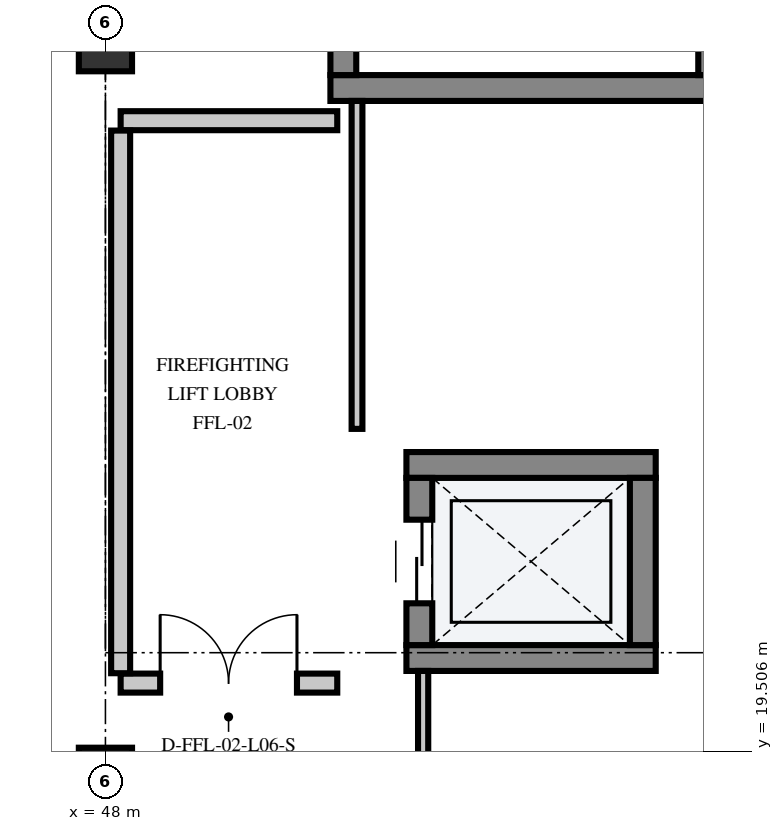
"""IFC4 building model, lengths in metres.
Left out: names, types, materials, properties, quantities, classifications, styles, units other than length and angle.
Written with IfcOpenShell. Run it as: python <this file> out.ifc"""

import sys

from ifc_helpers import new_model, si_unit, direction, frame, frame_2d, origin, origin_2d, place, context, subcontext, project, spatial, rectangle, extrude, element, fill, save


model = new_model("IFC4")
c1 = context("Model", 3, precision=1e-05, world=origin(), true_north=direction((0.0, 1.0)))
c2 = subcontext(c1, "Body", "Model", "MODEL_VIEW")
j1 = project(units=[si_unit("LENGTHUNIT", "METRE"), si_unit("PLANEANGLEUNIT", "RADIAN")], contexts=[c1])
p1 = place(None, origin())
s1 = spatial("IfcSite", under=j1, at=p1, CompositionType="ELEMENT")
p2 = place(p1, origin())
s2 = spatial("IfcBuilding", under=s1, at=p2, CompositionType="ELEMENT")
p3 = place(p2, frame((0.0, 0.0, 29.4)))
s3 = spatial("IfcBuildingStorey", under=s2, at=p3, CompositionType="ELEMENT", Elevation=29.4)
for number, where, z_axis, x_axis in (
    (1, (48.0, 19.2, 0.0), (0.0, 0.0, 1.0), (1.0, 0.0, 0.0)),
    (2, (48.0, 28.8, 0.0), (0.0, 0.0, 1.0), (1.0, 0.0, 0.0)),
):
    element("IfcColumn", number, at=place(p3, frame(where, z_axis=z_axis, x_axis=x_axis)), inside=s3, PredefinedType="COLUMN", context=c2, shape_type="SweptSolid", body=[
        extrude(rectangle(XDim=0.7, YDim=0.7, at=origin_2d()), origin(), (0.0, 0.0, 1.0), 4.8),
    ])
p4 = place(p3, frame((50.96, 28.23, 0.0), z_axis=(0.0, 0.0, 1.0), x_axis=(1.0, 0.0, 0.0)))
e3 = element("IfcWall", 3, at=p4, inside=s3, PredefinedType="SHEAR", context=c2, shape_type="SweptSolid", body=[
    extrude(rectangle(XDim=5.18, YDim=0.34, at=frame_2d((2.59, 0.0))), origin(), (0.0, 0.0, 1.0), 4.525),
])
p5 = place(p3, frame((55.97, 28.4, 0.0), z_axis=(0.0, 0.0, 1.0), x_axis=(0.0, 1.0, 0.0)))
e4 = element("IfcWall", 4, at=p5, inside=s3, PredefinedType="SHEAR", context=c2, shape_type="SweptSolid", body=[
    extrude(rectangle(XDim=8.8, YDim=0.34, at=frame_2d((4.4, 0.0))), origin(), (0.0, 0.0, 1.0), 4.525),
])
p6 = place(p3, frame((51.13, 28.4, 0.0), z_axis=(0.0, 0.0, 1.0), x_axis=(0.0, 1.0, 0.0)))
e5 = element("IfcWall", 5, at=p6, inside=s3, PredefinedType="SHEAR", context=c2, shape_type="SweptSolid", body=[
    extrude(rectangle(XDim=8.8, YDim=0.34, at=frame_2d((4.4, 0.0))), origin(), (0.0, 0.0, 1.0), 4.525),
])
p7 = place(p6, frame((0.45, 0.0, 0.0)))
e6 = element("IfcOpeningElement", 6, at=p7, cuts=e5, PredefinedType="OPENING", context=c2, shape_type="SweptSolid", body=[
    extrude(rectangle(XDim=1.35, YDim=2.2, at=frame_2d((0.675, 1.1))), frame((0.0, 0.182, 0.0), z_axis=(0.0, -1.0, 0.0), x_axis=(1.0, 0.0, 0.0)), (0.0, 0.0, 1.0), 0.364),
])
for number, where, z_axis, x_axis in (
    (7, (51.96, 20.73, 0.0), (0.0, 0.0, 1.0), (1.0, 0.0, 0.0)),
    (8, (51.96, 23.27, 0.0), (0.0, 0.0, 1.0), (1.0, 0.0, 0.0)),
):
    element("IfcWall", number, at=place(p3, frame(where, z_axis=z_axis, x_axis=x_axis)), inside=s3, PredefinedType="SHEAR", context=c2, shape_type="SweptSolid", body=[
        extrude(rectangle(XDim=3.28, YDim=0.34, at=frame_2d((1.64, 0.0))), origin(), (0.0, 0.0, 1.0), 4.525),
    ])
p8 = place(p3, frame((52.13, 20.9, 0.0), z_axis=(0.0, 0.0, 1.0), x_axis=(0.0, 1.0, 0.0)))
e9 = element("IfcWall", 9, at=p8, inside=s3, PredefinedType="SHEAR", context=c2, shape_type="SweptSolid", body=[
    extrude(rectangle(XDim=2.2, YDim=0.34, at=frame_2d((1.1, 0.0))), origin(), (0.0, 0.0, 1.0), 4.525),
])
p9 = place(p8, frame((0.55, 0.0, 0.0)))
e10 = element("IfcOpeningElement", 10, at=p9, cuts=e9, PredefinedType="OPENING", context=c2, shape_type="SweptSolid", body=[
    extrude(rectangle(XDim=1.1, YDim=2.15, at=frame_2d((0.55, 1.075))), frame((0.0, 0.182, 0.0), z_axis=(0.0, -1.0, 0.0), x_axis=(1.0, 0.0, 0.0)), (0.0, 0.0, 1.0), 0.364),
])
p10 = place(p3, frame((55.07, 20.9, 0.0), z_axis=(0.0, 0.0, 1.0), x_axis=(0.0, 1.0, 0.0)))
e11 = element("IfcWall", 11, at=p10, inside=s3, PredefinedType="SHEAR", context=c2, shape_type="SweptSolid", body=[
    extrude(rectangle(XDim=2.2, YDim=0.34, at=frame_2d((1.1, 0.0))), origin(), (0.0, 0.0, 1.0), 4.525),
])
p11 = place(p3, frame((48.2, 20.4, 0.0), z_axis=(0.0, 0.0, 1.0), x_axis=(1.0, 0.0, 0.0)))
e12 = element("IfcWall", 12, at=p11, inside=s3, PredefinedType="PARTITIONING", context=c2, shape_type="SweptSolid", body=[
    extrude(rectangle(XDim=2.85, YDim=0.25, at=frame_2d((1.425, 0.0))), origin(), (0.0, 0.0, 1.0), 3.465),
])
p12 = place(p11, frame((0.52, 0.0, 0.0)))
e13 = element("IfcOpeningElement", 13, at=p12, cuts=e12, PredefinedType="OPENING", context=c2, shape_type="SweptSolid", body=[
    extrude(rectangle(XDim=1.8, YDim=2.25, at=frame_2d((0.9, 1.125))), frame((0.0, 0.137, 0.0), z_axis=(0.0, -1.0, 0.0), x_axis=(1.0, 0.0, 0.0)), (0.0, 0.0, 1.0), 0.274),
])
p13 = place(p3, frame((48.2, 27.8, 0.0), z_axis=(0.0, 0.0, 1.0), x_axis=(1.0, 0.0, 0.0)))
e14 = element("IfcWall", 14, at=p13, inside=s3, PredefinedType="PARTITIONING", context=c2, shape_type="SweptSolid", body=[
    extrude(rectangle(XDim=2.85, YDim=0.25, at=frame_2d((1.425, 0.0))), origin(), (0.0, 0.0, 1.0), 3.465),
])
p14 = place(p3, frame((48.2, 20.53, 0.0), z_axis=(0.0, 0.0, 1.0), x_axis=(0.0, 1.0, 0.0)))
e15 = element("IfcWall", 15, at=p14, inside=s3, PredefinedType="PARTITIONING", context=c2, shape_type="SweptSolid", body=[
    extrude(rectangle(XDim=7.14, YDim=0.25, at=frame_2d((3.57, 0.0))), origin(), (0.0, 0.0, 1.0), 3.465),
])
p15 = place(p3, frame((51.31, 23.745, 0.0), z_axis=(0.0, 0.0, 1.0), x_axis=(0.0, 1.0, 0.0)))
e16 = element("IfcWall", 16, at=p15, inside=s3, PredefinedType="PARTITIONING", context=c2, shape_type="SweptSolid", body=[
    extrude(rectangle(XDim=4.315, YDim=0.142, at=frame_2d((2.158, 0.0))), origin(), (0.0, 0.0, 1.0), 4.525),
])
p16 = place(p3, frame((52.18, 15.04, 0.0), z_axis=(0.0, 0.0, 1.0), x_axis=(0.0, 1.0, 0.0)))
e17 = element("IfcWall", 17, at=p16, inside=s3, PredefinedType="PARTITIONING", context=c2, shape_type="SweptSolid", body=[
    extrude(rectangle(XDim=5.52, YDim=0.134, at=frame_2d((2.76, 0.0))), origin(), (0.0, 0.0, 1.0), 2.915),
])
p17 = place(p9, origin())
e18 = element("IfcDoor", 18, at=p17, inside=s3, OperationType="DOUBLE_DOOR_SLIDING", PredefinedType="DOOR", context=c2, shape_type="SweptSolid", body=[
    extrude(rectangle(XDim=1.1, YDim=2.15, at=frame_2d((0.55, 1.075))), frame((0.0, 0.025, 0.0), z_axis=(0.0, -1.0, 0.0), x_axis=(1.0, 0.0, 0.0)), (0.0, 0.0, 1.0), 0.05),
])
fill(e10, e18)
p18 = place(p12, origin())
e19 = element("IfcDoor", 19, at=p18, inside=s3, OperationType="DOUBLE_DOOR_SINGLE_SWING", PredefinedType="DOOR", context=c2, shape_type="SweptSolid", body=[
    extrude(rectangle(XDim=1.8, YDim=2.25, at=frame_2d((0.9, 1.125))), frame((0.0, 0.025, 0.0), z_axis=(0.0, -1.0, 0.0), x_axis=(1.0, 0.0, 0.0)), (0.0, 0.0, 1.0), 0.05),
])
fill(e13, e19)
save(model, sys.argv[1])
